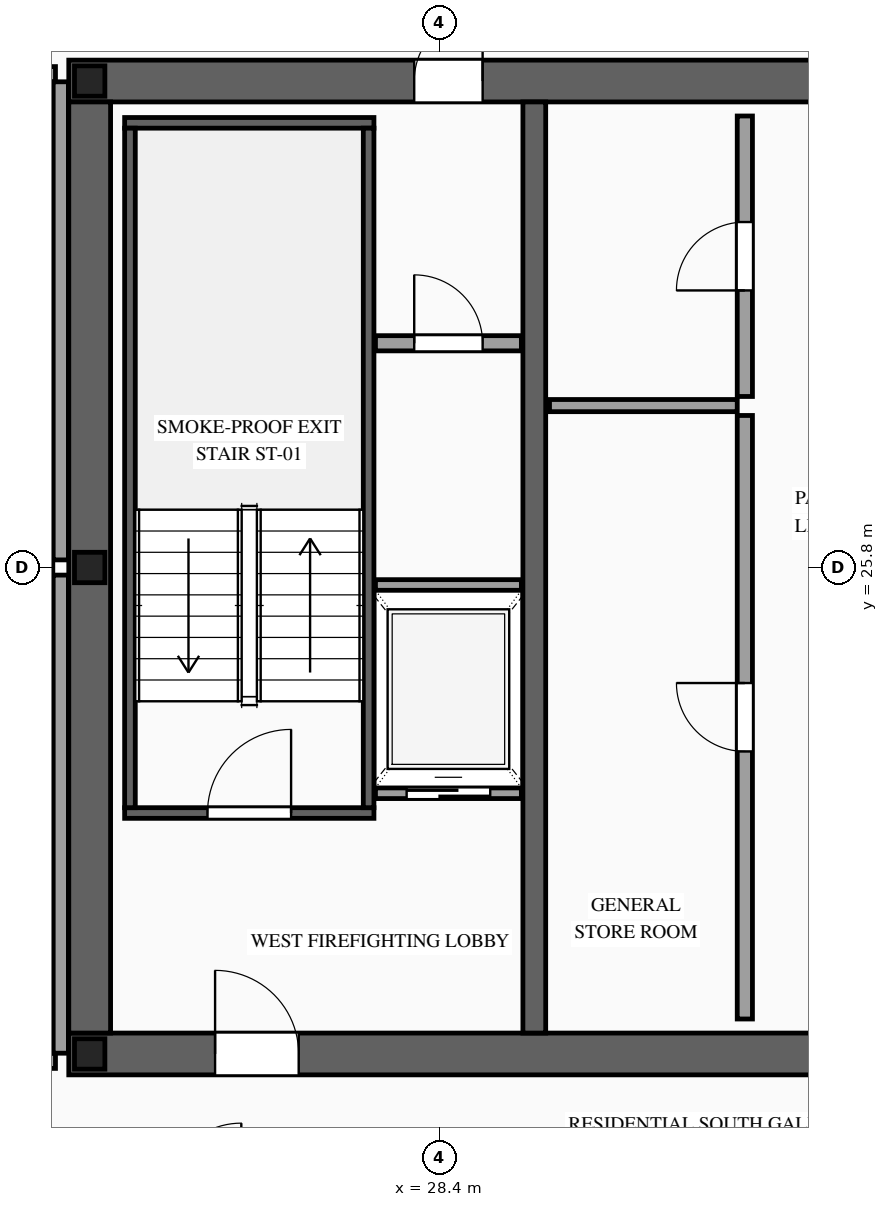
"""IFC4 building model, lengths in metres.
Left out: names, types, materials, properties, quantities, classifications, styles, units other than length and angle.
Written with IfcOpenShell. Run it as: python <this file> out.ifc"""

import sys

from ifc_helpers import new_model, si_unit, direction, frame, frame_2d, origin, origin_2d, place, context, subcontext, project, spatial, rectangle, i_section, extrude, source, transform, mapped, element, fill, save


model = new_model("IFC4")
c1 = context("Model", 3, precision=1e-05, world=origin(), true_north=direction((0.0, 1.0)))
c2 = subcontext(c1, "Body", "Model", "MODEL_VIEW")
j1 = project(units=[si_unit("LENGTHUNIT", "METRE"), si_unit("PLANEANGLEUNIT", "RADIAN")], contexts=[c1])
p1 = place(None, origin())
s1 = spatial("IfcSite", under=j1, at=p1, CompositionType="ELEMENT")
p2 = place(p1, origin())
s2 = spatial("IfcBuilding", under=s1, at=p2, CompositionType="ELEMENT")
p3 = place(p2, frame((0.0, 0.0, 241.6)))
s3 = spatial("IfcBuildingStorey", under=s2, at=p3, CompositionType="ELEMENT", Elevation=241.6)
p4 = place(p3, frame((23.525, 19.4, 0.0), z_axis=(0.0, 0.0, 1.0), x_axis=(1.0, 0.0, 0.0)))
e1 = element("IfcWall", 1, at=p4, inside=s3, PredefinedType="SHEAR", context=c2, shape_type="SweptSolid", body=[
    extrude(rectangle(XDim=26.95, YDim=0.55, at=frame_2d((13.475, 0.0))), origin(), (0.0, 0.0, 1.0), 3.5),
])
p5 = place(p4, frame((1.925, 0.0, 0.0)))
e2 = element("IfcOpeningElement", 2, at=p5, cuts=e1, PredefinedType="OPENING", context=c2, shape_type="SweptSolid", body=[
    extrude(rectangle(XDim=1.1, YDim=2.2, at=frame_2d((0.55, 1.1))), frame((0.0, 0.29, 0.0), z_axis=(0.0, -1.0, 0.0), x_axis=(1.0, 0.0, 0.0)), (0.0, 0.0, 1.0), 0.58),
])
p6 = place(p4, frame((9.825, 0.0, 0.0)))
e3 = element("IfcOpeningElement", 3, at=p6, cuts=e1, PredefinedType="OPENING", context=c2, shape_type="SweptSolid", body=[
    extrude(rectangle(XDim=1.1, YDim=2.2, at=frame_2d((0.55, 1.1))), frame((0.0, 0.29, 0.0), z_axis=(0.0, -1.0, 0.0), x_axis=(1.0, 0.0, 0.0)), (0.0, 0.0, 1.0), 0.58),
])
p7 = place(p4, frame((23.025, 0.0, 0.0)))
e4 = element("IfcOpeningElement", 4, at=p7, cuts=e1, PredefinedType="OPENING", context=c2, shape_type="SweptSolid", body=[
    extrude(rectangle(XDim=1.1, YDim=2.2, at=frame_2d((0.55, 1.1))), frame((0.0, 0.29, 0.0), z_axis=(0.0, -1.0, 0.0), x_axis=(1.0, 0.0, 0.0)), (0.0, 0.0, 1.0), 0.58),
])
p8 = place(p4, frame((19.645, 0.0, 0.0)))
e5 = element("IfcOpeningElement", 5, at=p8, cuts=e1, PredefinedType="OPENING", context=c2, shape_type="SweptSolid", body=[
    extrude(rectangle(XDim=0.9, YDim=2.15, at=frame_2d((0.45, 1.075))), frame((0.0, 0.29, 0.0), z_axis=(0.0, -1.0, 0.0), x_axis=(1.0, 0.0, 0.0)), (0.0, 0.0, 1.0), 0.58),
])
p9 = place(p4, frame((18.205, 0.0, 0.0)))
e6 = element("IfcOpeningElement", 6, at=p9, cuts=e1, PredefinedType="OPENING", context=c2, shape_type="SweptSolid", body=[
    extrude(rectangle(XDim=0.9, YDim=2.15, at=frame_2d((0.45, 1.075))), frame((0.0, 0.29, 0.0), z_axis=(0.0, -1.0, 0.0), x_axis=(1.0, 0.0, 0.0)), (0.0, 0.0, 1.0), 0.58),
])
p10 = place(p3, frame((23.525, 32.2, 0.0), z_axis=(0.0, 0.0, 1.0), x_axis=(1.0, 0.0, 0.0)))
e7 = element("IfcWall", 7, at=p10, inside=s3, PredefinedType="SHEAR", context=c2, shape_type="SweptSolid", body=[
    extrude(rectangle(XDim=26.95, YDim=0.55, at=frame_2d((13.475, 0.0))), origin(), (0.0, 0.0, 1.0), 3.5),
])
p11 = place(p10, frame((4.545, 0.0, 0.0)))
e8 = element("IfcOpeningElement", 8, at=p11, cuts=e7, PredefinedType="OPENING", context=c2, shape_type="SweptSolid", body=[
    extrude(rectangle(XDim=0.9, YDim=2.15, at=frame_2d((0.45, 1.075))), frame((0.0, 0.29, 0.0), z_axis=(0.0, -1.0, 0.0), x_axis=(1.0, 0.0, 0.0)), (0.0, 0.0, 1.0), 0.58),
])
p12 = place(p10, frame((9.825, 0.0, 0.0)))
e9 = element("IfcOpeningElement", 9, at=p12, cuts=e7, PredefinedType="OPENING", context=c2, shape_type="SweptSolid", body=[
    extrude(rectangle(XDim=1.1, YDim=2.2, at=frame_2d((0.55, 1.1))), frame((0.0, 0.29, 0.0), z_axis=(0.0, -1.0, 0.0), x_axis=(1.0, 0.0, 0.0)), (0.0, 0.0, 1.0), 0.58),
])
p13 = place(p10, frame((15.675, 0.0, 0.0)))
e10 = element("IfcOpeningElement", 10, at=p13, cuts=e7, PredefinedType="OPENING", context=c2, shape_type="SweptSolid", body=[
    extrude(rectangle(XDim=1.1, YDim=2.2, at=frame_2d((0.55, 1.1))), frame((0.0, 0.29, 0.0), z_axis=(0.0, -1.0, 0.0), x_axis=(1.0, 0.0, 0.0)), (0.0, 0.0, 1.0), 0.58),
])
p14 = place(p10, frame((18.205, 0.0, 0.0)))
e11 = element("IfcOpeningElement", 11, at=p14, cuts=e7, PredefinedType="OPENING", context=c2, shape_type="SweptSolid", body=[
    extrude(rectangle(XDim=0.9, YDim=2.15, at=frame_2d((0.45, 1.075))), frame((0.0, 0.29, 0.0), z_axis=(0.0, -1.0, 0.0), x_axis=(1.0, 0.0, 0.0)), (0.0, 0.0, 1.0), 0.58),
])
p15 = place(p10, frame((19.645, 0.0, 0.0)))
e12 = element("IfcOpeningElement", 12, at=p15, cuts=e7, PredefinedType="OPENING", context=c2, shape_type="SweptSolid", body=[
    extrude(rectangle(XDim=0.9, YDim=2.15, at=frame_2d((0.45, 1.075))), frame((0.0, 0.29, 0.0), z_axis=(0.0, -1.0, 0.0), x_axis=(1.0, 0.0, 0.0)), (0.0, 0.0, 1.0), 0.58),
])
m1 = source(origin(), c2, "Body", "SweptSolid", [
    extrude(rectangle(XDim=12.25, YDim=0.55, at=frame_2d((6.125, 0.0))), origin(), (0.0, 0.0, 1.0), 3.5),
])
p16 = place(p3, frame((23.8, 19.675, 0.0), z_axis=(0.0, 0.0, 1.0), x_axis=(0.0, 1.0, 0.0)))
e13 = element("IfcWall", 13, at=p16, inside=s3, PredefinedType="SHEAR", context=c2, shape_type="MappedRepresentation", body=[
    mapped(m1, transform((0.0, 0.0, 0.0), scale=1.0)),
])
m2 = source(origin(), c2, "Body", "SweptSolid", [
    extrude(rectangle(XDim=12.25, YDim=0.3, at=frame_2d((6.125, 0.0))), origin(), (0.0, 0.0, 1.0), 3.5),
])
p17 = place(p3, frame((29.65, 19.675, 0.0), z_axis=(0.0, 0.0, 1.0), x_axis=(0.0, 1.0, 0.0)))
e14 = element("IfcWall", 14, at=p17, inside=s3, PredefinedType="SOLIDWALL", context=c2, shape_type="MappedRepresentation", body=[
    mapped(m2, transform((0.0, 0.0, 0.0), scale=1.0)),
])
m3 = source(origin(), c2, "Body", "SweptSolid", [
    extrude(i_section(OverallWidth=0.4, OverallDepth=0.4, WebThickness=0.013, FlangeThickness=0.021, at=origin_2d()), origin(), (0.0, 0.0, 1.0), 3.5),
])
for number, where, z_axis, x_axis in (
    (15, (23.8, 19.4, 0.0), (0.0, 0.0, 1.0), (1.0, 0.0, 0.0)),
    (16, (23.8, 25.8, 0.0), (0.0, 0.0, 1.0), (1.0, 0.0, 0.0)),
    (17, (23.8, 32.2, 0.0), (0.0, 0.0, 1.0), (1.0, 0.0, 0.0)),
):
    element("IfcColumn", number, at=place(p3, frame(where, z_axis=z_axis, x_axis=x_axis)), inside=s3, PredefinedType="COLUMN", context=c2, shape_type="MappedRepresentation", body=[
        mapped(m3, transform((0.0, 0.0, 0.0), scale=1.0)),
    ])
p18 = place(p3, frame((27.56, 22.83, 0.0), z_axis=(0.0, 0.0, 1.0), x_axis=(1.0, 0.0, 0.0)))
e18 = element("IfcWall", 18, at=p18, inside=s3, PredefinedType="SOLIDWALL", context=c2, shape_type="SweptSolid", body=[
    extrude(rectangle(XDim=1.92, YDim=0.14, at=frame_2d((0.96, 0.0))), origin(), (0.0, 0.0, 1.0), 3.28),
])
p19 = place(p18, frame((0.41, 0.0, 0.0)))
e19 = element("IfcOpeningElement", 19, at=p19, cuts=e18, PredefinedType="OPENING", context=c2, shape_type="SweptSolid", body=[
    extrude(rectangle(XDim=1.1, YDim=2.2, at=frame_2d((0.55, 1.1))), frame((0.0, 0.085, 0.0), z_axis=(0.0, -1.0, 0.0), x_axis=(1.0, 0.0, 0.0)), (0.0, 0.0, 1.0), 0.17),
])
m4 = source(origin(), c2, "Body", "SweptSolid", [
    extrude(rectangle(XDim=1.92, YDim=0.14, at=frame_2d((0.96, 0.0))), origin(), (0.0, 0.0, 1.0), 3.28),
])
p20 = place(p3, frame((27.56, 25.57, 0.0), z_axis=(0.0, 0.0, 1.0), x_axis=(1.0, 0.0, 0.0)))
e20 = element("IfcWall", 20, at=p20, inside=s3, PredefinedType="SOLIDWALL", context=c2, shape_type="MappedRepresentation", body=[
    mapped(m4, transform((0.0, 0.0, 0.0), scale=1.0)),
])
p21 = place(p3, frame((24.26, 22.57, 0.0), z_axis=(0.0, 0.0, 1.0), x_axis=(1.0, 0.0, 0.0)))
e21 = element("IfcWall", 21, at=p21, inside=s3, PredefinedType="SOLIDWALL", context=c2, shape_type="SweptSolid", body=[
    extrude(rectangle(XDim=3.28, YDim=0.14, at=frame_2d((1.64, 0.0))), origin(), (0.0, 0.0, 1.0), 3.28),
])
p22 = place(p21, frame((1.09, 0.0, 0.0)))
e22 = element("IfcOpeningElement", 22, at=p22, cuts=e21, PredefinedType="OPENING", context=c2, shape_type="SweptSolid", body=[
    extrude(rectangle(XDim=1.1, YDim=2.2, at=frame_2d((0.55, 1.1))), frame((0.0, 0.085, 0.0), z_axis=(0.0, -1.0, 0.0), x_axis=(1.0, 0.0, 0.0)), (0.0, 0.0, 1.0), 0.17),
])
m5 = source(origin(), c2, "Body", "SweptSolid", [
    extrude(rectangle(XDim=3.28, YDim=0.14, at=frame_2d((1.64, 0.0))), origin(), (0.0, 0.0, 1.0), 3.28),
])
p23 = place(p3, frame((24.26, 31.65, 0.0), z_axis=(0.0, 0.0, 1.0), x_axis=(1.0, 0.0, 0.0)))
e23 = element("IfcWall", 23, at=p23, inside=s3, PredefinedType="SOLIDWALL", context=c2, shape_type="MappedRepresentation", body=[
    mapped(m5, transform((0.0, 0.0, 0.0), scale=1.0)),
])
m6 = source(origin(), c2, "Body", "SweptSolid", [
    extrude(rectangle(XDim=8.94, YDim=0.14, at=frame_2d((4.47, 0.0))), origin(), (0.0, 0.0, 1.0), 3.28),
])
for number, where, z_axis, x_axis in (
    (24, (24.33, 22.64, 0.0), (0.0, 0.0, 1.0), (0.0, 1.0, 0.0)),
    (25, (27.47, 22.64, 0.0), (0.0, 0.0, 1.0), (0.0, 1.0, 0.0)),
):
    element("IfcWall", number, at=place(p3, frame(where, z_axis=z_axis, x_axis=x_axis)), inside=s3, PredefinedType="SOLIDWALL", context=c2, shape_type="MappedRepresentation", body=[
        mapped(m6, transform((0.0, 0.0, 0.0), scale=1.0)),
    ])
p24 = place(p3, frame((27.56, 28.75, 0.0), z_axis=(0.0, 0.0, 1.0), x_axis=(1.0, 0.0, 0.0)))
e26 = element("IfcWall", 26, at=p24, inside=s3, PredefinedType="PARTITIONING", context=c2, shape_type="SweptSolid", body=[
    extrude(rectangle(XDim=1.92, YDim=0.2, at=frame_2d((0.96, 0.0))), origin(), (0.0, 0.0, 1.0), 3.28),
])
p25 = place(p24, frame((0.51, 0.0, 0.0)))
e27 = element("IfcOpeningElement", 27, at=p25, cuts=e26, PredefinedType="OPENING", context=c2, shape_type="SweptSolid", body=[
    extrude(rectangle(XDim=0.9, YDim=2.15, at=frame_2d((0.45, 1.075))), frame((0.0, 0.115, 0.0), z_axis=(0.0, -1.0, 0.0), x_axis=(1.0, 0.0, 0.0)), (0.0, 0.0, 1.0), 0.23),
])
p26 = place(p3, frame((32.42, 19.86, 0.0), z_axis=(0.0, 0.0, 1.0), x_axis=(0.0, 1.0, 0.0)))
e28 = element("IfcWall", 28, at=p26, inside=s3, PredefinedType="PARTITIONING", context=c2, shape_type="SweptSolid", body=[
    extrude(rectangle(XDim=7.94, YDim=0.2, at=frame_2d((3.97, 0.0))), origin(), (0.0, 0.0, 1.0), 3.28),
])
p27 = place(p26, frame((3.52, 0.0, 0.0)))
e29 = element("IfcOpeningElement", 29, at=p27, cuts=e28, PredefinedType="OPENING", context=c2, shape_type="SweptSolid", body=[
    extrude(rectangle(XDim=0.9, YDim=2.15, at=frame_2d((0.45, 1.075))), frame((0.0, 0.115, 0.0), z_axis=(0.0, -1.0, 0.0), x_axis=(1.0, 0.0, 0.0)), (0.0, 0.0, 1.0), 0.23),
])
p28 = place(p3, frame((32.42, 28.05, 0.0), z_axis=(0.0, 0.0, 1.0), x_axis=(0.0, 1.0, 0.0)))
e30 = element("IfcWall", 30, at=p28, inside=s3, PredefinedType="PARTITIONING", context=c2, shape_type="SweptSolid", body=[
    extrude(rectangle(XDim=3.69, YDim=0.2, at=frame_2d((1.845, 0.0))), origin(), (0.0, 0.0, 1.0), 3.28),
])
p29 = place(p28, frame((1.395, 0.0, 0.0)))
e31 = element("IfcOpeningElement", 31, at=p29, cuts=e30, PredefinedType="OPENING", context=c2, shape_type="SweptSolid", body=[
    extrude(rectangle(XDim=0.9, YDim=2.15, at=frame_2d((0.45, 1.075))), frame((0.0, 0.115, 0.0), z_axis=(0.0, -1.0, 0.0), x_axis=(1.0, 0.0, 0.0)), (0.0, 0.0, 1.0), 0.23),
])
m7 = source(origin(), c2, "Body", "SweptSolid", [
    extrude(rectangle(XDim=2.47, YDim=0.16, at=frame_2d((1.235, 0.0))), origin(), (0.0, 0.0, 1.0), 3.28),
])
p30 = place(p3, frame((29.85, 27.93, 0.0), z_axis=(0.0, 0.0, 1.0), x_axis=(1.0, 0.0, 0.0)))
e32 = element("IfcWall", 32, at=p30, inside=s3, PredefinedType="PARTITIONING", context=c2, shape_type="MappedRepresentation", body=[
    mapped(m7, transform((0.0, 0.0, 0.0), scale=1.0)),
])
p31 = place(p3, frame((16.55, 19.31, 0.0), z_axis=(0.0, 0.0, 1.0), x_axis=(1.0, 0.0, 0.0)))
e33 = element("IfcWall", 33, at=p31, inside=s3, PredefinedType="PARTITIONING", context=c2, shape_type="SweptSolid", body=[
    extrude(rectangle(XDim=6.8, YDim=0.2, at=frame_2d((3.4, 0.0))), origin(), (0.0, 0.0, 1.0), 2.825),
])
p32 = place(p31, frame((3.0, 0.0, 0.0)))
e34 = element("IfcOpeningElement", 34, at=p32, cuts=e33, PredefinedType="OPENING", context=c2, shape_type="SweptSolid", body=[
    extrude(rectangle(XDim=1.0, YDim=2.2, at=frame_2d((0.5, 1.1))), frame((0.0, 0.115, 0.0), z_axis=(0.0, -1.0, 0.0), x_axis=(1.0, 0.0, 0.0)), (0.0, 0.0, 1.0), 0.23),
])
m8 = source(origin(), c2, "Body", "SweptSolid", [
    extrude(rectangle(XDim=6.765, YDim=0.2, at=frame_2d((3.382, 0.0))), origin(), (0.0, 0.0, 1.0), 2.787),
])
p33 = place(p3, frame((16.55, 25.8, 0.0), z_axis=(0.0, 0.0, 1.0), x_axis=(1.0, 0.0, 0.0)))
e35 = element("IfcWall", 35, at=p33, inside=s3, PredefinedType="PARTITIONING", context=c2, shape_type="MappedRepresentation", body=[
    mapped(m8, transform((0.0, 0.0, 0.0), scale=1.0)),
])
m9 = source(origin(), c2, "Body", "SweptSolid", [
    extrude(rectangle(XDim=6.29, YDim=0.2, at=frame_2d((3.145, 0.0))), origin(), (0.0, 0.0, 1.0), 3.28),
])
p34 = place(p3, frame((23.42, 19.41, 0.0), z_axis=(0.0, 0.0, 1.0), x_axis=(0.0, 1.0, 0.0)))
e36 = element("IfcWall", 36, at=p34, inside=s3, PredefinedType="PARTITIONING", context=c2, shape_type="MappedRepresentation", body=[
    mapped(m9, transform((0.0, 0.0, 0.0), scale=1.0)),
])
p35 = place(p3, frame((16.55, 32.29, 0.0), z_axis=(0.0, 0.0, 1.0), x_axis=(1.0, 0.0, 0.0)))
e37 = element("IfcWall", 37, at=p35, inside=s3, PredefinedType="PARTITIONING", context=c2, shape_type="SweptSolid", body=[
    extrude(rectangle(XDim=6.8, YDim=0.2, at=frame_2d((3.4, 0.0))), origin(), (0.0, 0.0, 1.0), 2.825),
])
p36 = place(p35, frame((2.965, 0.0, 0.0)))
e38 = element("IfcOpeningElement", 38, at=p36, cuts=e37, PredefinedType="OPENING", context=c2, shape_type="SweptSolid", body=[
    extrude(rectangle(XDim=1.0, YDim=2.2, at=frame_2d((0.5, 1.1))), frame((0.0, 0.115, 0.0), z_axis=(0.0, -1.0, 0.0), x_axis=(1.0, 0.0, 0.0)), (0.0, 0.0, 1.0), 0.23),
])
p37 = place(p3, frame((23.42, 25.9, 0.0), z_axis=(0.0, 0.0, 1.0), x_axis=(0.0, 1.0, 0.0)))
e39 = element("IfcWall", 39, at=p37, inside=s3, PredefinedType="PARTITIONING", context=c2, shape_type="MappedRepresentation", body=[
    mapped(m9, transform((0.0, 0.0, 0.0), scale=1.0)),
])
m10 = source(origin(), c2, "Body", "SweptSolid", [
    extrude(rectangle(XDim=1.1, YDim=2.2, at=frame_2d((0.55, 1.1))), frame((0.0, 0.025, 0.0), z_axis=(0.0, -1.0, 0.0), x_axis=(1.0, 0.0, 0.0)), (0.0, 0.0, 1.0), 0.05),
])
p38 = place(p19, origin())
e40 = element("IfcDoor", 40, at=p38, inside=s3, OperationType="SLIDING_TO_LEFT", PredefinedType="DOOR", context=c2, shape_type="MappedRepresentation", body=[
    mapped(m10, transform((0.0, 0.0, 0.0), scale=1.0)),
])
fill(e19, e40)
m11 = source(origin(), c2, "Body", "SweptSolid", [
    extrude(rectangle(XDim=1.1, YDim=2.2, at=frame_2d((0.55, 1.1))), frame((0.0, 0.025, 0.0), z_axis=(0.0, -1.0, 0.0), x_axis=(1.0, 0.0, 0.0)), (0.0, 0.0, 1.0), 0.05),
])
p39 = place(p22, origin())
e41 = element("IfcDoor", 41, at=p39, inside=s3, OperationType="SINGLE_SWING_RIGHT", PredefinedType="DOOR", context=c2, shape_type="MappedRepresentation", body=[
    mapped(m11, transform((0.0, 0.0, 0.0), scale=1.0)),
])
fill(e22, e41)
p40 = place(p5, origin())
e42 = element("IfcDoor", 42, at=p40, inside=s3, OperationType="SINGLE_SWING_LEFT", PredefinedType="DOOR", context=c2, shape_type="MappedRepresentation", body=[
    mapped(m11, transform((0.0, 0.0, 0.0), scale=1.0)),
])
fill(e2, e42)
m12 = source(origin(), c2, "Body", "SweptSolid", [
    extrude(rectangle(XDim=0.9, YDim=2.15, at=frame_2d((0.45, 1.075))), frame((0.0, 0.025, 0.0), z_axis=(0.0, -1.0, 0.0), x_axis=(1.0, 0.0, 0.0)), (0.0, 0.0, 1.0), 0.05),
])
p41 = place(p11, origin())
e43 = element("IfcDoor", 43, at=p41, inside=s3, OperationType="SINGLE_SWING_RIGHT", PredefinedType="DOOR", context=c2, shape_type="MappedRepresentation", body=[
    mapped(m12, transform((0.0, 0.0, 0.0), scale=1.0)),
])
fill(e8, e43)
p42 = place(p25, origin())
e44 = element("IfcDoor", 44, at=p42, inside=s3, OperationType="SINGLE_SWING_LEFT", PredefinedType="DOOR", context=c2, shape_type="MappedRepresentation", body=[
    mapped(m12, transform((0.0, 0.0, 0.0), scale=1.0)),
])
fill(e27, e44)
p43 = place(p27, origin())
e45 = element("IfcDoor", 45, at=p43, inside=s3, OperationType="SINGLE_SWING_RIGHT", PredefinedType="DOOR", context=c2, shape_type="MappedRepresentation", body=[
    mapped(m12, transform((0.0, 0.0, 0.0), scale=1.0)),
])
fill(e29, e45)
p44 = place(p29, origin())
e46 = element("IfcDoor", 46, at=p44, inside=s3, OperationType="SINGLE_SWING_LEFT", PredefinedType="DOOR", context=c2, shape_type="MappedRepresentation", body=[
    mapped(m12, transform((0.0, 0.0, 0.0), scale=1.0)),
])
fill(e31, e46)
save(model, sys.argv[1])
